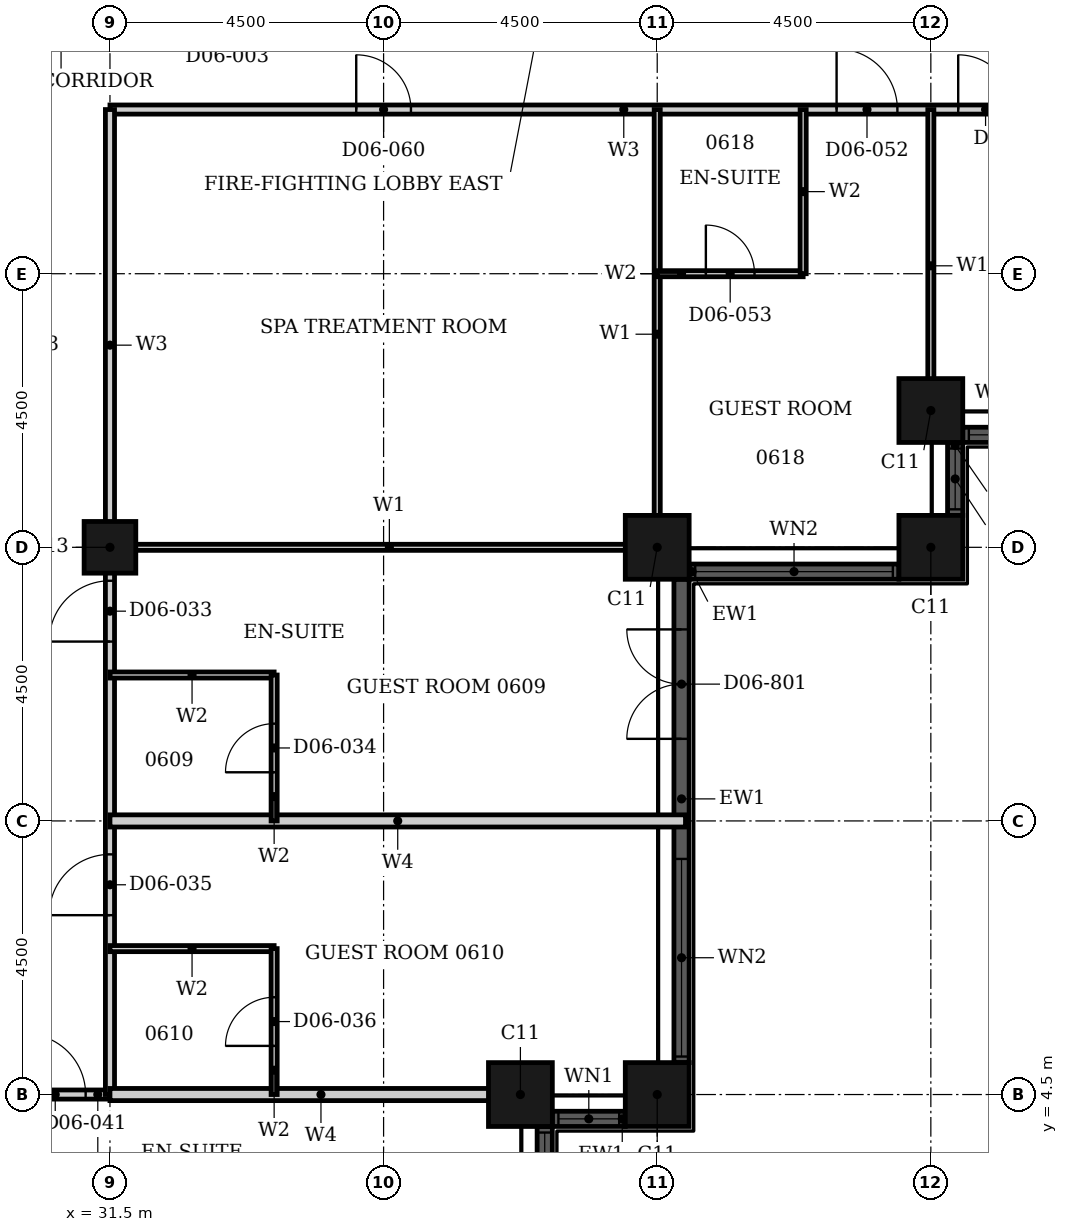
"""IFC4 building model, lengths in metres.
Left out: names, types, materials, properties, quantities, classifications, styles, units other than length and angle.
Written with IfcOpenShell. Run it as: python <this file> out.ifc"""

import sys

from ifc_helpers import new_model, si_unit, direction, frame, frame_2d, origin, origin_2d, place, context, subcontext, project, spatial, rectangle, hollow_rectangle, extrude, element, fill, save


model = new_model("IFC4")
c1 = context("Model", 3, precision=1e-05, world=origin(), true_north=direction((0.0, 1.0)))
c2 = subcontext(c1, "Body", "Model", "MODEL_VIEW")
j1 = project(units=[si_unit("LENGTHUNIT", "METRE"), si_unit("PLANEANGLEUNIT", "RADIAN")], contexts=[c1])
p1 = place(None, origin())
s1 = spatial("IfcSite", under=j1, at=p1, CompositionType="ELEMENT")
p2 = place(p1, origin())
s2 = spatial("IfcBuilding", under=s1, at=p2, CompositionType="ELEMENT")
p3 = place(p2, frame((0.0, 0.0, 33.6)))
s3 = spatial("IfcBuildingStorey", under=s2, at=p3, CompositionType="ELEMENT", Elevation=33.6)
for number, where, z_axis, x_axis in (
    (1, (38.25, 4.5, 0.0), (0.0, 0.0, 1.0), (1.0, 0.0, 0.0)),
    (2, (40.5, 4.5, 0.0), (0.0, 0.0, 1.0), (1.0, 0.0, 0.0)),
    (3, (40.5, 13.5, 0.0), (0.0, 0.0, 1.0), (1.0, 0.0, 0.0)),
    (4, (45.0, 13.5, 0.0), (0.0, 0.0, 1.0), (1.0, 0.0, 0.0)),
    (5, (45.0, 15.75, 0.0), (0.0, 0.0, 1.0), (1.0, 0.0, 0.0)),
):
    element("IfcColumn", number, at=place(p3, frame(where, z_axis=z_axis, x_axis=x_axis)), inside=s3, PredefinedType="COLUMN", context=c2, shape_type="SweptSolid", body=[
        extrude(hollow_rectangle(XDim=1.05, YDim=1.05, WallThickness=0.034, at=origin_2d()), origin(), (0.0, 0.0, 1.0), 3.6),
    ])
p4 = place(p3, frame((31.5, 13.5, 0.0), z_axis=(0.0, 0.0, 1.0), x_axis=(1.0, 0.0, 0.0)))
e6 = element("IfcColumn", 6, at=p4, inside=s3, PredefinedType="COLUMN", context=c2, shape_type="SweptSolid", body=[
    extrude(hollow_rectangle(XDim=0.85, YDim=0.85, WallThickness=0.026, at=origin_2d()), origin(), (0.0, 0.0, 1.0), 3.6),
])
p5 = place(p3, frame((38.65, 2.775, 0.0), z_axis=(0.0, 0.0, 1.0), x_axis=(0.0, 1.0, 0.0)))
e7 = element("IfcWall", 7, at=p5, inside=s3, PredefinedType="SOLIDWALL", context=c2, shape_type="SweptSolid", body=[
    extrude(rectangle(XDim=1.2, YDim=0.25, at=frame_2d((0.6, 0.0))), origin(), (0.0, 0.0, 1.0), 3.6),
])
p6 = place(p5, frame((0.1, 0.0, 0.9)))
e8 = element("IfcOpeningElement", 8, at=p6, cuts=e7, PredefinedType="OPENING", context=c2, shape_type="SweptSolid", body=[
    extrude(rectangle(XDim=1.0, YDim=2.08, at=frame_2d((0.5, 1.04))), frame((0.0, 0.135, 0.0), z_axis=(0.0, -1.0, 0.0), x_axis=(1.0, 0.0, 0.0)), (0.0, 0.0, 1.0), 0.27),
])
p7 = place(p3, frame((38.775, 4.1, 0.0), z_axis=(0.0, 0.0, 1.0), x_axis=(1.0, 0.0, 0.0)))
e9 = element("IfcWall", 9, at=p7, inside=s3, PredefinedType="SOLIDWALL", context=c2, shape_type="SweptSolid", body=[
    extrude(rectangle(XDim=1.2, YDim=0.25, at=frame_2d((0.6, 0.0))), origin(), (0.0, 0.0, 1.0), 3.6),
])
p8 = place(p7, frame((0.1, 0.0, 0.9)))
e10 = element("IfcOpeningElement", 10, at=p8, cuts=e9, PredefinedType="OPENING", context=c2, shape_type="SweptSolid", body=[
    extrude(rectangle(XDim=1.0, YDim=2.08, at=frame_2d((0.5, 1.04))), frame((0.0, 0.135, 0.0), z_axis=(0.0, -1.0, 0.0), x_axis=(1.0, 0.0, 0.0)), (0.0, 0.0, 1.0), 0.27),
])
p9 = place(p3, frame((40.9, 5.025, 0.0), z_axis=(0.0, 0.0, 1.0), x_axis=(0.0, 1.0, 0.0)))
e11 = element("IfcWall", 11, at=p9, inside=s3, PredefinedType="SOLIDWALL", context=c2, shape_type="SweptSolid", body=[
    extrude(rectangle(XDim=7.95, YDim=0.25, at=frame_2d((3.975, 0.0))), origin(), (0.0, 0.0, 1.0), 3.6),
])
p10 = place(p9, frame((0.1, 0.0, 0.9)))
e12 = element("IfcOpeningElement", 12, at=p10, cuts=e11, PredefinedType="OPENING", context=c2, shape_type="SweptSolid", body=[
    extrude(rectangle(XDim=3.25, YDim=2.08, at=frame_2d((1.625, 1.04))), frame((0.0, 0.135, 0.0), z_axis=(0.0, -1.0, 0.0), x_axis=(1.0, 0.0, 0.0)), (0.0, 0.0, 1.0), 0.27),
])
p11 = place(p9, frame((5.325, 0.0, 0.0)))
e13 = element("IfcOpeningElement", 13, at=p11, cuts=e11, PredefinedType="OPENING", context=c2, shape_type="SweptSolid", body=[
    extrude(rectangle(XDim=1.8, YDim=2.4, at=frame_2d((0.9, 1.2))), frame((0.0, 0.135, 0.0), z_axis=(0.0, -1.0, 0.0), x_axis=(1.0, 0.0, 0.0)), (0.0, 0.0, 1.0), 0.27),
])
p12 = place(p3, frame((41.025, 13.1, 0.0), z_axis=(0.0, 0.0, 1.0), x_axis=(1.0, 0.0, 0.0)))
e14 = element("IfcWall", 14, at=p12, inside=s3, PredefinedType="SOLIDWALL", context=c2, shape_type="SweptSolid", body=[
    extrude(rectangle(XDim=3.45, YDim=0.25, at=frame_2d((1.725, 0.0))), origin(), (0.0, 0.0, 1.0), 3.6),
])
p13 = place(p12, frame((0.1, 0.0, 0.9)))
e15 = element("IfcOpeningElement", 15, at=p13, cuts=e14, PredefinedType="OPENING", context=c2, shape_type="SweptSolid", body=[
    extrude(rectangle(XDim=3.25, YDim=2.08, at=frame_2d((1.625, 1.04))), frame((0.0, 0.135, 0.0), z_axis=(0.0, -1.0, 0.0), x_axis=(1.0, 0.0, 0.0)), (0.0, 0.0, 1.0), 0.27),
])
p14 = place(p3, frame((45.4, 14.025, 0.0), z_axis=(0.0, 0.0, 1.0), x_axis=(0.0, 1.0, 0.0)))
e16 = element("IfcWall", 16, at=p14, inside=s3, PredefinedType="SOLIDWALL", context=c2, shape_type="SweptSolid", body=[
    extrude(rectangle(XDim=1.2, YDim=0.25, at=frame_2d((0.6, 0.0))), origin(), (0.0, 0.0, 1.0), 3.6),
])
p15 = place(p14, frame((0.1, 0.0, 0.9)))
e17 = element("IfcOpeningElement", 17, at=p15, cuts=e16, PredefinedType="OPENING", context=c2, shape_type="SweptSolid", body=[
    extrude(rectangle(XDim=1.0, YDim=2.08, at=frame_2d((0.5, 1.04))), frame((0.0, 0.135, 0.0), z_axis=(0.0, -1.0, 0.0), x_axis=(1.0, 0.0, 0.0)), (0.0, 0.0, 1.0), 0.27),
])
p16 = place(p3, frame((45.525, 15.35, 0.0), z_axis=(0.0, 0.0, 1.0), x_axis=(1.0, 0.0, 0.0)))
e18 = element("IfcWall", 18, at=p16, inside=s3, PredefinedType="SOLIDWALL", context=c2, shape_type="SweptSolid", body=[
    extrude(rectangle(XDim=1.2, YDim=0.25, at=frame_2d((0.6, 0.0))), origin(), (0.0, 0.0, 1.0), 3.6),
])
p17 = place(p16, frame((0.1, 0.0, 0.9)))
e19 = element("IfcOpeningElement", 19, at=p17, cuts=e18, PredefinedType="OPENING", context=c2, shape_type="SweptSolid", body=[
    extrude(rectangle(XDim=1.0, YDim=2.08, at=frame_2d((0.5, 1.04))), frame((0.0, 0.135, 0.0), z_axis=(0.0, -1.0, 0.0), x_axis=(1.0, 0.0, 0.0)), (0.0, 0.0, 1.0), 0.27),
])
p18 = place(p3, frame((31.5, 20.7, 0.0), z_axis=(0.0, 0.0, 1.0), x_axis=(1.0, 0.0, 0.0)))
e20 = element("IfcWall", 20, at=p18, inside=s3, PredefinedType="PARTITIONING", context=c2, shape_type="SweptSolid", body=[
    extrude(rectangle(XDim=15.3, YDim=0.15, at=frame_2d((7.65, 0.0))), origin(), (0.0, 0.0, 1.0), 3.3),
])
p19 = place(p18, frame((11.95, 0.0, 0.0)))
e21 = element("IfcOpeningElement", 21, at=p19, cuts=e20, PredefinedType="OPENING", context=c2, shape_type="SweptSolid", body=[
    extrude(rectangle(XDim=1.0, YDim=2.1, at=frame_2d((0.5, 1.05))), frame((0.0, 0.085, 0.0), z_axis=(0.0, -1.0, 0.0), x_axis=(1.0, 0.0, 0.0)), (0.0, 0.0, 1.0), 0.17),
])
p20 = place(p18, frame((13.95, 0.0, 0.0)))
e22 = element("IfcOpeningElement", 22, at=p20, cuts=e20, PredefinedType="OPENING", context=c2, shape_type="SweptSolid", body=[
    extrude(rectangle(XDim=0.9, YDim=2.1, at=frame_2d((0.45, 1.05))), frame((0.0, 0.085, 0.0), z_axis=(0.0, -1.0, 0.0), x_axis=(1.0, 0.0, 0.0)), (0.0, 0.0, 1.0), 0.17),
])
p21 = place(p18, frame((4.05, 0.0, 0.0)))
e23 = element("IfcOpeningElement", 23, at=p21, cuts=e20, PredefinedType="OPENING", context=c2, shape_type="SweptSolid", body=[
    extrude(rectangle(XDim=0.9, YDim=2.1, at=frame_2d((0.45, 1.05))), frame((0.0, 0.085, 0.0), z_axis=(0.0, -1.0, 0.0), x_axis=(1.0, 0.0, 0.0)), (0.0, 0.0, 1.0), 0.17),
])
p22 = place(p3, frame((29.7, 4.5, 0.0), z_axis=(0.0, 0.0, 1.0), x_axis=(1.0, 0.0, 0.0)))
e24 = element("IfcWall", 24, at=p22, inside=s3, PredefinedType="PARTITIONING", context=c2, shape_type="SweptSolid", body=[
    extrude(rectangle(XDim=1.8, YDim=0.15, at=frame_2d((0.9, 0.0))), origin(), (0.0, 0.0, 1.0), 3.3),
])
p23 = place(p22, frame((0.4, 0.0, 0.0)))
e25 = element("IfcOpeningElement", 25, at=p23, cuts=e24, PredefinedType="OPENING", context=c2, shape_type="SweptSolid", body=[
    extrude(rectangle(XDim=1.0, YDim=2.1, at=frame_2d((0.5, 1.05))), frame((0.0, 0.085, 0.0), z_axis=(0.0, -1.0, 0.0), x_axis=(1.0, 0.0, 0.0)), (0.0, 0.0, 1.0), 0.17),
])
p24 = place(p3, frame((31.5, 4.5, 0.0), z_axis=(0.0, 0.0, 1.0), x_axis=(0.0, 1.0, 0.0)))
e26 = element("IfcWall", 26, at=p24, inside=s3, PredefinedType="PARTITIONING", context=c2, shape_type="SweptSolid", body=[
    extrude(rectangle(XDim=16.2, YDim=0.15, at=frame_2d((8.1, 0.0))), origin(), (0.0, 0.0, 1.0), 2.58),
])
p25 = place(p24, frame((7.45, 0.0, 0.0)))
e27 = element("IfcOpeningElement", 27, at=p25, cuts=e26, PredefinedType="OPENING", context=c2, shape_type="SweptSolid", body=[
    extrude(rectangle(XDim=1.0, YDim=2.1, at=frame_2d((0.5, 1.05))), frame((0.0, 0.085, 0.0), z_axis=(0.0, -1.0, 0.0), x_axis=(1.0, 0.0, 0.0)), (0.0, 0.0, 1.0), 0.17),
])
p26 = place(p24, frame((2.95, 0.0, 0.0)))
e28 = element("IfcOpeningElement", 28, at=p26, cuts=e26, PredefinedType="OPENING", context=c2, shape_type="SweptSolid", body=[
    extrude(rectangle(XDim=1.0, YDim=2.1, at=frame_2d((0.5, 1.05))), frame((0.0, 0.085, 0.0), z_axis=(0.0, -1.0, 0.0), x_axis=(1.0, 0.0, 0.0)), (0.0, 0.0, 1.0), 0.17),
])
p27 = place(p3, frame((31.5, 13.5, 0.0), z_axis=(0.0, 0.0, 1.0), x_axis=(1.0, 0.0, 0.0)))
e29 = element("IfcWall", 29, at=p27, inside=s3, PredefinedType="PARTITIONING", context=c2, shape_type="SweptSolid", body=[
    extrude(rectangle(XDim=9.19, YDim=0.1, at=frame_2d((4.595, 0.0))), origin(), (0.0, 0.0, 1.0), 2.38),
])
p28 = place(p3, frame((40.5, 13.31, 0.0), z_axis=(0.0, 0.0, 1.0), x_axis=(0.0, 1.0, 0.0)))
e30 = element("IfcWall", 30, at=p28, inside=s3, PredefinedType="PARTITIONING", context=c2, shape_type="SweptSolid", body=[
    extrude(rectangle(XDim=7.39, YDim=0.1, at=frame_2d((3.695, 0.0))), origin(), (0.0, 0.0, 1.0), 3.3),
])
p29 = place(p3, frame((45.0, 15.56, 0.0), z_axis=(0.0, 0.0, 1.0), x_axis=(0.0, 1.0, 0.0)))
e31 = element("IfcWall", 31, at=p29, inside=s3, PredefinedType="PARTITIONING", context=c2, shape_type="SweptSolid", body=[
    extrude(rectangle(XDim=5.14, YDim=0.1, at=frame_2d((2.57, 0.0))), origin(), (0.0, 0.0, 1.0), 3.3),
])
p30 = place(p3, frame((31.5, 4.5, 0.0), z_axis=(0.0, 0.0, 1.0), x_axis=(1.0, 0.0, 0.0)))
e32 = element("IfcWall", 32, at=p30, inside=s3, PredefinedType="PARTITIONING", context=c2, shape_type="SweptSolid", body=[
    extrude(rectangle(XDim=6.94, YDim=0.2, at=frame_2d((3.47, 0.0))), origin(), (0.0, 0.0, 1.0), 3.3),
])
p31 = place(p3, frame((31.5, 9.0, 0.0), z_axis=(0.0, 0.0, 1.0), x_axis=(1.0, 0.0, 0.0)))
e33 = element("IfcWall", 33, at=p31, inside=s3, PredefinedType="PARTITIONING", context=c2, shape_type="SweptSolid", body=[
    extrude(rectangle(XDim=9.465, YDim=0.2, at=frame_2d((4.732, 0.0))), origin(), (0.0, 0.0, 1.0), 3.3),
])
p32 = place(p3, frame((31.5, 11.4, 0.0), z_axis=(0.0, 0.0, 1.0), x_axis=(1.0, 0.0, 0.0)))
e34 = element("IfcWall", 34, at=p32, inside=s3, PredefinedType="PARTITIONING", context=c2, shape_type="SweptSolid", body=[
    extrude(rectangle(XDim=2.7, YDim=0.1, at=frame_2d((1.35, 0.0))), origin(), (0.0, 0.0, 1.0), 3.3),
])
p33 = place(p3, frame((40.5, 18.0, 0.0), z_axis=(0.0, 0.0, 1.0), x_axis=(1.0, 0.0, 0.0)))
e35 = element("IfcWall", 35, at=p33, inside=s3, PredefinedType="PARTITIONING", context=c2, shape_type="SweptSolid", body=[
    extrude(rectangle(XDim=2.4, YDim=0.1, at=frame_2d((1.2, 0.0))), origin(), (0.0, 0.0, 1.0), 3.3),
])
p34 = place(p33, frame((0.8, 0.0, 0.0)))
e36 = element("IfcOpeningElement", 36, at=p34, cuts=e35, PredefinedType="OPENING", context=c2, shape_type="SweptSolid", body=[
    extrude(rectangle(XDim=0.8, YDim=2.1, at=frame_2d((0.4, 1.05))), frame((0.0, 0.06, 0.0), z_axis=(0.0, -1.0, 0.0), x_axis=(1.0, 0.0, 0.0)), (0.0, 0.0, 1.0), 0.12),
])
p35 = place(p3, frame((31.5, 6.9, 0.0), z_axis=(0.0, 0.0, 1.0), x_axis=(1.0, 0.0, 0.0)))
e37 = element("IfcWall", 37, at=p35, inside=s3, PredefinedType="PARTITIONING", context=c2, shape_type="SweptSolid", body=[
    extrude(rectangle(XDim=2.7, YDim=0.1, at=frame_2d((1.35, 0.0))), origin(), (0.0, 0.0, 1.0), 3.3),
])
p36 = place(p3, frame((34.2, 9.0, 0.0), z_axis=(0.0, 0.0, 1.0), x_axis=(0.0, 1.0, 0.0)))
e38 = element("IfcWall", 38, at=p36, inside=s3, PredefinedType="PARTITIONING", context=c2, shape_type="SweptSolid", body=[
    extrude(rectangle(XDim=2.4, YDim=0.1, at=frame_2d((1.2, 0.0))), origin(), (0.0, 0.0, 1.0), 3.3),
])
p37 = place(p36, frame((0.8, 0.0, 0.0)))
e39 = element("IfcOpeningElement", 39, at=p37, cuts=e38, PredefinedType="OPENING", context=c2, shape_type="SweptSolid", body=[
    extrude(rectangle(XDim=0.8, YDim=2.1, at=frame_2d((0.4, 1.05))), frame((0.0, 0.06, 0.0), z_axis=(0.0, -1.0, 0.0), x_axis=(1.0, 0.0, 0.0)), (0.0, 0.0, 1.0), 0.12),
])
p38 = place(p3, frame((34.2, 4.5, 0.0), z_axis=(0.0, 0.0, 1.0), x_axis=(0.0, 1.0, 0.0)))
e40 = element("IfcWall", 40, at=p38, inside=s3, PredefinedType="PARTITIONING", context=c2, shape_type="SweptSolid", body=[
    extrude(rectangle(XDim=2.4, YDim=0.1, at=frame_2d((1.2, 0.0))), origin(), (0.0, 0.0, 1.0), 3.3),
])
p39 = place(p38, frame((0.8, 0.0, 0.0)))
e41 = element("IfcOpeningElement", 41, at=p39, cuts=e40, PredefinedType="OPENING", context=c2, shape_type="SweptSolid", body=[
    extrude(rectangle(XDim=0.8, YDim=2.1, at=frame_2d((0.4, 1.05))), frame((0.0, 0.06, 0.0), z_axis=(0.0, -1.0, 0.0), x_axis=(1.0, 0.0, 0.0)), (0.0, 0.0, 1.0), 0.12),
])
p40 = place(p3, frame((42.9, 18.0, 0.0), z_axis=(0.0, 0.0, 1.0), x_axis=(0.0, 1.0, 0.0)))
e42 = element("IfcWall", 42, at=p40, inside=s3, PredefinedType="PARTITIONING", context=c2, shape_type="SweptSolid", body=[
    extrude(rectangle(XDim=2.7, YDim=0.1, at=frame_2d((1.35, 0.0))), origin(), (0.0, 0.0, 1.0), 3.3),
])
p41 = place(p6, origin())
e43 = element("IfcWindow", 43, at=p41, inside=s3, PartitioningType="SINGLE_PANEL", PredefinedType="WINDOW", context=c2, shape_type="SweptSolid", body=[
    extrude(rectangle(XDim=1.0, YDim=2.08, at=frame_2d((0.5, 1.04))), frame((0.0, 0.03, 0.0), z_axis=(0.0, -1.0, 0.0), x_axis=(1.0, 0.0, 0.0)), (0.0, 0.0, 1.0), 0.06),
])
fill(e8, e43)
p42 = place(p8, origin())
e44 = element("IfcWindow", 44, at=p42, inside=s3, PartitioningType="SINGLE_PANEL", PredefinedType="WINDOW", context=c2, shape_type="SweptSolid", body=[
    extrude(rectangle(XDim=1.0, YDim=2.08, at=frame_2d((0.5, 1.04))), frame((0.0, 0.03, 0.0), z_axis=(0.0, -1.0, 0.0), x_axis=(1.0, 0.0, 0.0)), (0.0, 0.0, 1.0), 0.06),
])
fill(e10, e44)
p43 = place(p10, origin())
e45 = element("IfcWindow", 45, at=p43, inside=s3, PartitioningType="SINGLE_PANEL", PredefinedType="WINDOW", context=c2, shape_type="SweptSolid", body=[
    extrude(rectangle(XDim=3.25, YDim=2.08, at=frame_2d((1.625, 1.04))), frame((0.0, 0.03, 0.0), z_axis=(0.0, -1.0, 0.0), x_axis=(1.0, 0.0, 0.0)), (0.0, 0.0, 1.0), 0.06),
])
fill(e12, e45)
p44 = place(p11, origin())
e46 = element("IfcDoor", 46, at=p44, inside=s3, OperationType="DOUBLE_DOOR_SINGLE_SWING", PredefinedType="DOOR", context=c2, shape_type="SweptSolid", body=[
    extrude(rectangle(XDim=1.8, YDim=2.4, at=frame_2d((0.9, 1.2))), frame((0.0, 0.025, 0.0), z_axis=(0.0, -1.0, 0.0), x_axis=(1.0, 0.0, 0.0)), (0.0, 0.0, 1.0), 0.05),
])
fill(e13, e46)
p45 = place(p13, origin())
e47 = element("IfcWindow", 47, at=p45, inside=s3, PartitioningType="SINGLE_PANEL", PredefinedType="WINDOW", context=c2, shape_type="SweptSolid", body=[
    extrude(rectangle(XDim=3.25, YDim=2.08, at=frame_2d((1.625, 1.04))), frame((0.0, 0.03, 0.0), z_axis=(0.0, -1.0, 0.0), x_axis=(1.0, 0.0, 0.0)), (0.0, 0.0, 1.0), 0.06),
])
fill(e15, e47)
p46 = place(p15, origin())
e48 = element("IfcWindow", 48, at=p46, inside=s3, PartitioningType="SINGLE_PANEL", PredefinedType="WINDOW", context=c2, shape_type="SweptSolid", body=[
    extrude(rectangle(XDim=1.0, YDim=2.08, at=frame_2d((0.5, 1.04))), frame((0.0, 0.03, 0.0), z_axis=(0.0, -1.0, 0.0), x_axis=(1.0, 0.0, 0.0)), (0.0, 0.0, 1.0), 0.06),
])
fill(e17, e48)
p47 = place(p17, origin())
e49 = element("IfcWindow", 49, at=p47, inside=s3, PartitioningType="SINGLE_PANEL", PredefinedType="WINDOW", context=c2, shape_type="SweptSolid", body=[
    extrude(rectangle(XDim=1.0, YDim=2.08, at=frame_2d((0.5, 1.04))), frame((0.0, 0.03, 0.0), z_axis=(0.0, -1.0, 0.0), x_axis=(1.0, 0.0, 0.0)), (0.0, 0.0, 1.0), 0.06),
])
fill(e19, e49)
p48 = place(p25, origin())
e50 = element("IfcDoor", 50, at=p48, inside=s3, OperationType="SINGLE_SWING_RIGHT", PredefinedType="DOOR", context=c2, shape_type="SweptSolid", body=[
    extrude(rectangle(XDim=1.0, YDim=2.1, at=frame_2d((0.5, 1.05))), frame((0.0, 0.025, 0.0), z_axis=(0.0, -1.0, 0.0), x_axis=(1.0, 0.0, 0.0)), (0.0, 0.0, 1.0), 0.05),
])
fill(e27, e50)
p49 = place(p37, origin())
e51 = element("IfcDoor", 51, at=p49, inside=s3, OperationType="SINGLE_SWING_RIGHT", PredefinedType="DOOR", context=c2, shape_type="SweptSolid", body=[
    extrude(rectangle(XDim=0.8, YDim=2.1, at=frame_2d((0.4, 1.05))), frame((0.0, 0.025, 0.0), z_axis=(0.0, -1.0, 0.0), x_axis=(1.0, 0.0, 0.0)), (0.0, 0.0, 1.0), 0.05),
])
fill(e39, e51)
p50 = place(p26, origin())
e52 = element("IfcDoor", 52, at=p50, inside=s3, OperationType="SINGLE_SWING_RIGHT", PredefinedType="DOOR", context=c2, shape_type="SweptSolid", body=[
    extrude(rectangle(XDim=1.0, YDim=2.1, at=frame_2d((0.5, 1.05))), frame((0.0, 0.025, 0.0), z_axis=(0.0, -1.0, 0.0), x_axis=(1.0, 0.0, 0.0)), (0.0, 0.0, 1.0), 0.05),
])
fill(e28, e52)
p51 = place(p39, origin())
e53 = element("IfcDoor", 53, at=p51, inside=s3, OperationType="SINGLE_SWING_RIGHT", PredefinedType="DOOR", context=c2, shape_type="SweptSolid", body=[
    extrude(rectangle(XDim=0.8, YDim=2.1, at=frame_2d((0.4, 1.05))), frame((0.0, 0.025, 0.0), z_axis=(0.0, -1.0, 0.0), x_axis=(1.0, 0.0, 0.0)), (0.0, 0.0, 1.0), 0.05),
])
fill(e41, e53)
p52 = place(p23, origin())
e54 = element("IfcDoor", 54, at=p52, inside=s3, OperationType="SINGLE_SWING_LEFT", PredefinedType="DOOR", context=c2, shape_type="SweptSolid", body=[
    extrude(rectangle(XDim=1.0, YDim=2.1, at=frame_2d((0.5, 1.05))), frame((0.0, 0.025, 0.0), z_axis=(0.0, -1.0, 0.0), x_axis=(1.0, 0.0, 0.0)), (0.0, 0.0, 1.0), 0.05),
])
fill(e25, e54)
p53 = place(p19, origin())
e55 = element("IfcDoor", 55, at=p53, inside=s3, OperationType="SINGLE_SWING_RIGHT", PredefinedType="DOOR", context=c2, shape_type="SweptSolid", body=[
    extrude(rectangle(XDim=1.0, YDim=2.1, at=frame_2d((0.5, 1.05))), frame((0.0, 0.025, 0.0), z_axis=(0.0, -1.0, 0.0), x_axis=(1.0, 0.0, 0.0)), (0.0, 0.0, 1.0), 0.05),
])
fill(e21, e55)
p54 = place(p34, origin())
e56 = element("IfcDoor", 56, at=p54, inside=s3, OperationType="SINGLE_SWING_RIGHT", PredefinedType="DOOR", context=c2, shape_type="SweptSolid", body=[
    extrude(rectangle(XDim=0.8, YDim=2.1, at=frame_2d((0.4, 1.05))), frame((0.0, 0.025, 0.0), z_axis=(0.0, -1.0, 0.0), x_axis=(1.0, 0.0, 0.0)), (0.0, 0.0, 1.0), 0.05),
])
fill(e36, e56)
p55 = place(p20, origin())
e57 = element("IfcDoor", 57, at=p55, inside=s3, OperationType="SINGLE_SWING_RIGHT", PredefinedType="DOOR", context=c2, shape_type="SweptSolid", body=[
    extrude(rectangle(XDim=0.9, YDim=2.1, at=frame_2d((0.45, 1.05))), frame((0.0, 0.025, 0.0), z_axis=(0.0, -1.0, 0.0), x_axis=(1.0, 0.0, 0.0)), (0.0, 0.0, 1.0), 0.05),
])
fill(e22, e57)
p56 = place(p21, origin())
e58 = element("IfcDoor", 58, at=p56, inside=s3, OperationType="SINGLE_SWING_LEFT", PredefinedType="DOOR", context=c2, shape_type="SweptSolid", body=[
    extrude(rectangle(XDim=0.9, YDim=2.1, at=frame_2d((0.45, 1.05))), frame((0.0, 0.025, 0.0), z_axis=(0.0, -1.0, 0.0), x_axis=(1.0, 0.0, 0.0)), (0.0, 0.0, 1.0), 0.05),
])
fill(e23, e58)
save(model, sys.argv[1])
